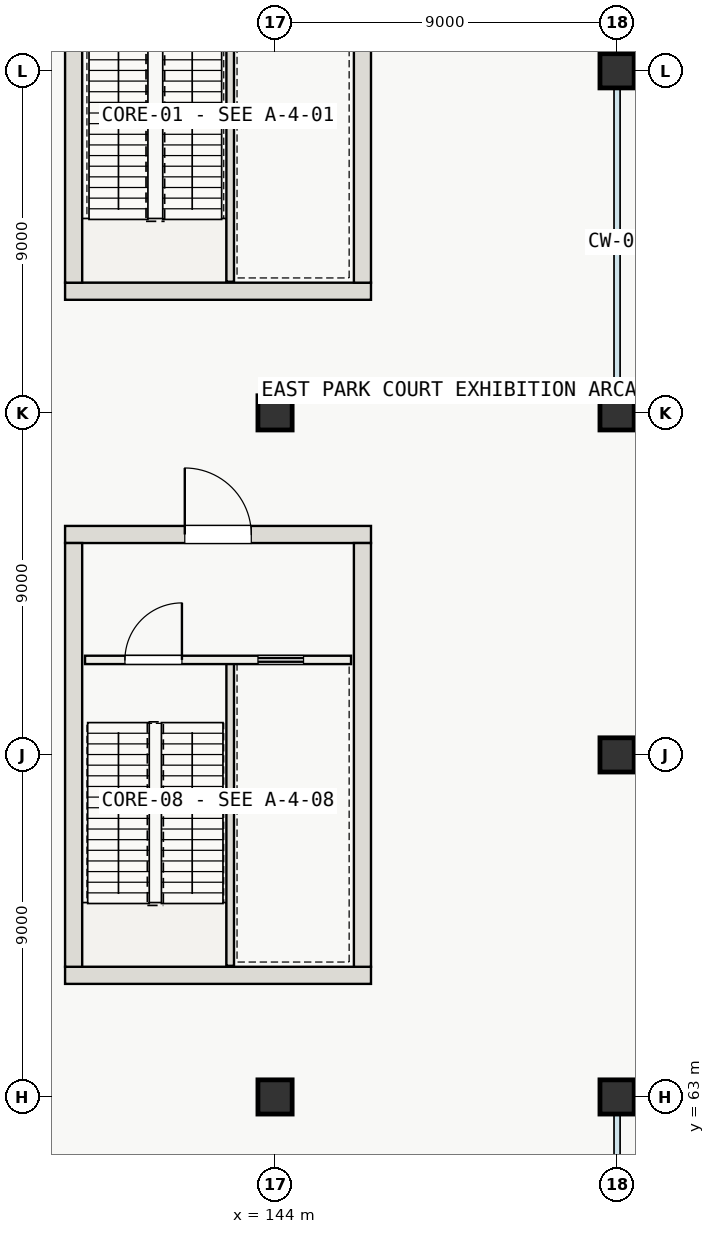
"""IFC4 building model, lengths in metres.
Left out: names, types, materials, properties, quantities, classifications, styles, units other than length and angle.
Written with IfcOpenShell. Run it as: python <this file> out.ifc"""

import sys

from ifc_helpers import new_model, si_unit, direction, frame, frame_2d, origin, origin_2d, place, context, subcontext, project, spatial, rectangle, extrude, element, fill, save


model = new_model("IFC4")
c1 = context("Model", 3, precision=1e-05, world=origin(), true_north=direction((0.0, 1.0)))
c2 = subcontext(c1, "Body", "Model", "MODEL_VIEW")
j1 = project(units=[si_unit("LENGTHUNIT", "METRE"), si_unit("PLANEANGLEUNIT", "RADIAN")], contexts=[c1])
p1 = place(None, origin())
s1 = spatial("IfcSite", under=j1, at=p1, CompositionType="ELEMENT")
p2 = place(p1, origin())
s2 = spatial("IfcBuilding", under=s1, at=p2, CompositionType="ELEMENT")
p3 = place(p2, origin())
s3 = spatial("IfcBuildingStorey", under=s2, at=p3, CompositionType="ELEMENT", Elevation=0.0)
p4 = place(p3, frame((138.475, 84.2, 0.0), z_axis=(0.0, 0.0, 1.0), x_axis=(1.0, 0.0, 0.0)))
e1 = element("IfcWall", 1, at=p4, inside=s3, PredefinedType="SHEAR", context=c2, shape_type="SweptSolid", body=[
    extrude(rectangle(XDim=8.05, YDim=0.45, at=frame_2d((4.025, 0.0))), origin(), (0.0, 0.0, 1.0), 6.0),
])
for number, where, z_axis, x_axis in (
    (2, (138.7, 84.425, 0.0), (0.0, 0.0, 1.0), (0.0, 1.0, 0.0)),
    (3, (146.3, 84.425, 0.0), (0.0, 0.0, 1.0), (0.0, 1.0, 0.0)),
):
    element("IfcWall", number, at=place(p3, frame(where, z_axis=z_axis, x_axis=x_axis)), inside=s3, PredefinedType="SHEAR", context=c2, shape_type="SweptSolid", body=[
        extrude(rectangle(XDim=11.15, YDim=0.45, at=frame_2d((5.575, 0.0))), origin(), (0.0, 0.0, 1.0), 6.0),
    ])
p5 = place(p3, frame((138.475, 66.2, 0.0), z_axis=(0.0, 0.0, 1.0), x_axis=(1.0, 0.0, 0.0)))
e4 = element("IfcWall", 4, at=p5, inside=s3, PredefinedType="SHEAR", context=c2, shape_type="SweptSolid", body=[
    extrude(rectangle(XDim=8.05, YDim=0.45, at=frame_2d((4.025, 0.0))), origin(), (0.0, 0.0, 1.0), 6.0),
])
p6 = place(p3, frame((138.475, 77.8, 0.0), z_axis=(0.0, 0.0, 1.0), x_axis=(1.0, 0.0, 0.0)))
e5 = element("IfcWall", 5, at=p6, inside=s3, PredefinedType="SHEAR", context=c2, shape_type="SweptSolid", body=[
    extrude(rectangle(XDim=8.05, YDim=0.45, at=frame_2d((4.025, 0.0))), origin(), (0.0, 0.0, 1.0), 6.0),
])
p7 = place(p6, frame((3.15, 0.0, 0.0)))
e6 = element("IfcOpeningElement", 6, at=p7, cuts=e5, PredefinedType="OPENING", context=c2, shape_type="SweptSolid", body=[
    extrude(rectangle(XDim=1.75, YDim=2.3, at=frame_2d((0.875, 1.15))), frame((0.0, 0.235, 0.0), z_axis=(0.0, -1.0, 0.0), x_axis=(1.0, 0.0, 0.0)), (0.0, 0.0, 1.0), 0.47),
])
for number, where, z_axis, x_axis in (
    (7, (138.7, 66.425, 0.0), (0.0, 0.0, 1.0), (0.0, 1.0, 0.0)),
    (8, (146.3, 66.425, 0.0), (0.0, 0.0, 1.0), (0.0, 1.0, 0.0)),
):
    element("IfcWall", number, at=place(p3, frame(where, z_axis=z_axis, x_axis=x_axis)), inside=s3, PredefinedType="SHEAR", context=c2, shape_type="SweptSolid", body=[
        extrude(rectangle(XDim=11.15, YDim=0.45, at=frame_2d((5.575, 0.0))), origin(), (0.0, 0.0, 1.0), 6.0),
    ])
for number, where, z_axis, x_axis in (
    (9, (144.0, 63.0, 0.0), (0.0, 0.0, 1.0), (1.0, 0.0, 0.0)),
    (10, (144.0, 81.0, 0.0), (0.0, 0.0, 1.0), (1.0, 0.0, 0.0)),
    (11, (153.0, 63.0, 0.0), (0.0, 0.0, 1.0), (1.0, 0.0, 0.0)),
    (12, (153.0, 72.0, 0.0), (0.0, 0.0, 1.0), (1.0, 0.0, 0.0)),
    (13, (153.0, 81.0, 0.0), (0.0, 0.0, 1.0), (1.0, 0.0, 0.0)),
    (14, (153.0, 90.0, 0.0), (0.0, 0.0, 1.0), (1.0, 0.0, 0.0)),
):
    element("IfcColumn", number, at=place(p3, frame(where, z_axis=z_axis, x_axis=x_axis)), inside=s3, PredefinedType="COLUMN", context=c2, shape_type="SweptSolid", body=[
        extrude(rectangle(XDim=0.9, YDim=0.9, at=origin_2d()), origin(), (0.0, 0.0, 1.0), 6.0),
    ])
for number, where, z_axis, x_axis in (
    (15, (142.82, 84.45, 0.0), (0.0, 0.0, 1.0), (0.0, 1.0, 0.0)),
    (16, (142.82, 66.45, 0.0), (0.0, 0.0, 1.0), (0.0, 1.0, 0.0)),
):
    element("IfcWall", number, at=place(p3, frame(where, z_axis=z_axis, x_axis=x_axis)), inside=s3, PredefinedType="SOLIDWALL", context=c2, shape_type="SweptSolid", body=[
        extrude(rectangle(XDim=8.0, YDim=0.2, at=frame_2d((4.0, 0.0))), origin(), (0.0, 0.0, 1.0), 6.0),
    ])
p8 = place(p3, frame((139.0, 74.5, 0.0), z_axis=(0.0, 0.0, 1.0), x_axis=(1.0, 0.0, 0.0)))
e17 = element("IfcWall", 17, at=p8, inside=s3, PredefinedType="SOLIDWALL", context=c2, shape_type="SweptSolid", body=[
    extrude(rectangle(XDim=7.0, YDim=0.22, at=frame_2d((3.5, 0.0))), origin(), (0.0, 0.0, 1.0), 5.68),
])
p9 = place(p8, frame((1.05, 0.0, 0.0)))
e18 = element("IfcOpeningElement", 18, at=p9, cuts=e17, PredefinedType="OPENING", context=c2, shape_type="SweptSolid", body=[
    extrude(rectangle(XDim=1.5, YDim=2.2, at=frame_2d((0.75, 1.1))), frame((0.0, 0.12, 0.0), z_axis=(0.0, -1.0, 0.0), x_axis=(1.0, 0.0, 0.0)), (0.0, 0.0, 1.0), 0.24),
])
p10 = place(p8, frame((4.55, 0.0, 0.0)))
e19 = element("IfcOpeningElement", 19, at=p10, cuts=e17, PredefinedType="OPENING", context=c2, shape_type="SweptSolid", body=[
    extrude(rectangle(XDim=1.2, YDim=2.2, at=frame_2d((0.6, 1.1))), frame((0.0, 0.12, 0.0), z_axis=(0.0, -1.0, 0.0), x_axis=(1.0, 0.0, 0.0)), (0.0, 0.0, 1.0), 0.24),
])
p11 = place(p9, origin())
e20 = element("IfcDoor", 20, at=p11, inside=s3, OperationType="SINGLE_SWING_RIGHT", PredefinedType="DOOR", context=c2, shape_type="SweptSolid", body=[
    extrude(rectangle(XDim=1.5, YDim=2.2, at=frame_2d((0.75, 1.1))), frame((0.0, 0.025, 0.0), z_axis=(0.0, -1.0, 0.0), x_axis=(1.0, 0.0, 0.0)), (0.0, 0.0, 1.0), 0.05),
])
fill(e18, e20)
p12 = place(p10, origin())
e21 = element("IfcDoor", 21, at=p12, inside=s3, OperationType="SLIDING_TO_RIGHT", PredefinedType="DOOR", context=c2, shape_type="SweptSolid", body=[
    extrude(rectangle(XDim=1.2, YDim=2.2, at=frame_2d((0.6, 1.1))), frame((0.0, 0.025, 0.0), z_axis=(0.0, -1.0, 0.0), x_axis=(1.0, 0.0, 0.0)), (0.0, 0.0, 1.0), 0.05),
])
fill(e19, e21)
p13 = place(p7, origin())
e22 = element("IfcDoor", 22, at=p13, inside=s3, OperationType="DOUBLE_DOOR_SINGLE_SWING", PredefinedType="DOOR", context=c2, shape_type="SweptSolid", body=[
    extrude(rectangle(XDim=1.75, YDim=2.3, at=frame_2d((0.875, 1.15))), frame((0.0, 0.025, 0.0), z_axis=(0.0, -1.0, 0.0), x_axis=(1.0, 0.0, 0.0)), (0.0, 0.0, 1.0), 0.05),
])
fill(e6, e22)
save(model, sys.argv[1])
